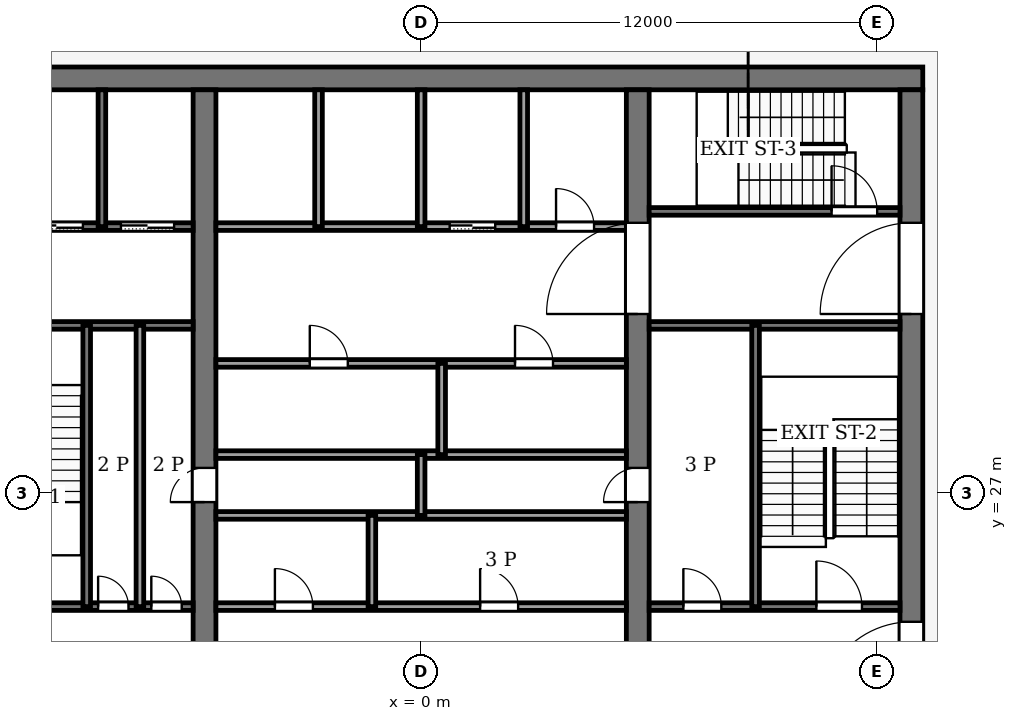
"""IFC4 building model, lengths in metres.
Left out: names, types, materials, properties, quantities, classifications, styles, units other than length and angle.
Written with IfcOpenShell. Run it as: python <this file> out.ifc"""

import sys

from ifc_helpers import new_model, si_unit, direction, frame, frame_2d, origin, place, context, subcontext, project, spatial, rectangle, extrude, element, fill, save


model = new_model("IFC4")
c1 = context("Model", 3, precision=1e-05, world=origin(), true_north=direction((0.0, 1.0)))
c2 = subcontext(c1, "Body", "Model", "MODEL_VIEW")
j1 = project(units=[si_unit("LENGTHUNIT", "METRE"), si_unit("PLANEANGLEUNIT", "RADIAN")], contexts=[c1])
p1 = place(None, origin())
s1 = spatial("IfcSite", under=j1, at=p1, CompositionType="ELEMENT")
p2 = place(p1, origin())
s2 = spatial("IfcBuilding", under=s1, at=p2, CompositionType="ELEMENT")
p3 = place(p2, frame((0.0, 0.0, 314.0)))
s3 = spatial("IfcBuildingStorey", under=s2, at=p3, CompositionType="ELEMENT", Elevation=314.0)
p4 = place(p3, frame((-13.2, 37.9, -0.13), z_axis=(0.0, 0.0, 1.0), x_axis=(1.0, 0.0, 0.0)))
e1 = element("IfcWall", 1, at=p4, inside=s3, PredefinedType="SHEAR", context=c2, shape_type="SweptSolid", body=[
    extrude(rectangle(XDim=26.4, YDim=0.6, at=frame_2d((13.2, 0.0))), origin(), (0.0, 0.0, 1.0), 4.0),
])
p5 = place(p3, frame((12.9, 18.4, -0.13), z_axis=(0.0, 0.0, 1.0), x_axis=(0.0, 1.0, 0.0)))
e2 = element("IfcWall", 2, at=p5, inside=s3, PredefinedType="SHEAR", context=c2, shape_type="SweptSolid", body=[
    extrude(rectangle(XDim=19.2, YDim=0.6, at=frame_2d((9.6, 0.0))), origin(), (0.0, 0.0, 1.0), 4.0),
])
p6 = place(p5, frame((2.8, 0.0, 0.13)))
e3 = element("IfcOpeningElement", 3, at=p6, cuts=e2, PredefinedType="OPENING", context=c2, shape_type="SweptSolid", body=[
    extrude(rectangle(XDim=2.4, YDim=2.4, at=frame_2d((1.2, 1.2))), frame((0.0, 0.31, 0.0), z_axis=(0.0, -1.0, 0.0), x_axis=(1.0, 0.0, 0.0)), (0.0, 0.0, 1.0), 0.62),
])
p7 = place(p5, frame((13.3, 0.0, 0.13)))
e4 = element("IfcOpeningElement", 4, at=p7, cuts=e2, PredefinedType="OPENING", context=c2, shape_type="SweptSolid", body=[
    extrude(rectangle(XDim=2.4, YDim=2.4, at=frame_2d((1.2, 1.2))), frame((0.0, 0.31, 0.0), z_axis=(0.0, -1.0, 0.0), x_axis=(1.0, 0.0, 0.0)), (0.0, 0.0, 1.0), 0.62),
])
p8 = place(p3, frame((-5.7, 18.4, -0.13), z_axis=(0.0, 0.0, 1.0), x_axis=(0.0, 1.0, 0.0)))
e5 = element("IfcWall", 5, at=p8, inside=s3, PredefinedType="SHEAR", context=c2, shape_type="SweptSolid", body=[
    extrude(rectangle(XDim=19.2, YDim=0.6, at=frame_2d((9.6, 0.0))), origin(), (0.0, 0.0, 1.0), 4.0),
])
p9 = place(p8, frame((8.35, 0.0, 0.13)))
e6 = element("IfcOpeningElement", 6, at=p9, cuts=e5, PredefinedType="OPENING", context=c2, shape_type="SweptSolid", body=[
    extrude(rectangle(XDim=0.9, YDim=2.1, at=frame_2d((0.45, 1.05))), frame((0.0, 0.31, 0.0), z_axis=(0.0, -1.0, 0.0), x_axis=(1.0, 0.0, 0.0)), (0.0, 0.0, 1.0), 0.62),
])
p10 = place(p3, frame((5.7, 18.4, -0.13), z_axis=(0.0, 0.0, 1.0), x_axis=(0.0, 1.0, 0.0)))
e7 = element("IfcWall", 7, at=p10, inside=s3, PredefinedType="SHEAR", context=c2, shape_type="SweptSolid", body=[
    extrude(rectangle(XDim=19.2, YDim=0.6, at=frame_2d((9.6, 0.0))), origin(), (0.0, 0.0, 1.0), 4.0),
])
p11 = place(p10, frame((8.35, 0.0, 0.13)))
e8 = element("IfcOpeningElement", 8, at=p11, cuts=e7, PredefinedType="OPENING", context=c2, shape_type="SweptSolid", body=[
    extrude(rectangle(XDim=0.9, YDim=2.1, at=frame_2d((0.45, 1.05))), frame((0.0, 0.31, 0.0), z_axis=(0.0, -1.0, 0.0), x_axis=(1.0, 0.0, 0.0)), (0.0, 0.0, 1.0), 0.62),
])
p12 = place(p10, frame((13.3, 0.0, 0.13)))
e9 = element("IfcOpeningElement", 9, at=p12, cuts=e7, PredefinedType="OPENING", context=c2, shape_type="SweptSolid", body=[
    extrude(rectangle(XDim=2.4, YDim=2.4, at=frame_2d((1.2, 1.2))), frame((0.0, 0.31, 0.0), z_axis=(0.0, -1.0, 0.0), x_axis=(1.0, 0.0, 0.0)), (0.0, 0.0, 1.0), 0.62),
])
p13 = place(p3, frame((-12.6, 24.0, 0.0), z_axis=(0.0, 0.0, 1.0), x_axis=(1.0, 0.0, 0.0)))
e10 = element("IfcWall", 10, at=p13, inside=s3, PredefinedType="PARTITIONING", context=c2, shape_type="SweptSolid", body=[
    extrude(rectangle(XDim=6.6, YDim=0.2, at=frame_2d((3.3, 0.0))), origin(), (0.0, 0.0, 1.0), 3.87),
])
p14 = place(p13, frame((4.1, 0.0, 0.0)))
e11 = element("IfcOpeningElement", 11, at=p14, cuts=e10, PredefinedType="OPENING", context=c2, shape_type="SweptSolid", body=[
    extrude(rectangle(XDim=0.8, YDim=2.1, at=frame_2d((0.4, 1.05))), frame((0.0, 0.11, 0.0), z_axis=(0.0, -1.0, 0.0), x_axis=(1.0, 0.0, 0.0)), (0.0, 0.0, 1.0), 0.22),
])
p15 = place(p13, frame((5.5, 0.0, 0.0)))
e12 = element("IfcOpeningElement", 12, at=p15, cuts=e10, PredefinedType="OPENING", context=c2, shape_type="SweptSolid", body=[
    extrude(rectangle(XDim=0.8, YDim=2.1, at=frame_2d((0.4, 1.05))), frame((0.0, 0.11, 0.0), z_axis=(0.0, -1.0, 0.0), x_axis=(1.0, 0.0, 0.0)), (0.0, 0.0, 1.0), 0.22),
])
p16 = place(p3, frame((-5.4, 24.0, 0.0), z_axis=(0.0, 0.0, 1.0), x_axis=(1.0, 0.0, 0.0)))
e13 = element("IfcWall", 13, at=p16, inside=s3, PredefinedType="PARTITIONING", context=c2, shape_type="SweptSolid", body=[
    extrude(rectangle(XDim=10.8, YDim=0.2, at=frame_2d((5.4, 0.0))), origin(), (0.0, 0.0, 1.0), 3.87),
])
p17 = place(p16, frame((1.552, 0.0, 0.0)))
e14 = element("IfcOpeningElement", 14, at=p17, cuts=e13, PredefinedType="OPENING", context=c2, shape_type="SweptSolid", body=[
    extrude(rectangle(XDim=1.0, YDim=2.1, at=frame_2d((0.5, 1.05))), frame((0.0, 0.11, 0.0), z_axis=(0.0, -1.0, 0.0), x_axis=(1.0, 0.0, 0.0)), (0.0, 0.0, 1.0), 0.22),
])
p18 = place(p16, frame((6.952, 0.0, 0.0)))
e15 = element("IfcOpeningElement", 15, at=p18, cuts=e13, PredefinedType="OPENING", context=c2, shape_type="SweptSolid", body=[
    extrude(rectangle(XDim=1.0, YDim=2.1, at=frame_2d((0.5, 1.05))), frame((0.0, 0.11, 0.0), z_axis=(0.0, -1.0, 0.0), x_axis=(1.0, 0.0, 0.0)), (0.0, 0.0, 1.0), 0.22),
])
p19 = place(p3, frame((6.0, 24.0, 0.0), z_axis=(0.0, 0.0, 1.0), x_axis=(1.0, 0.0, 0.0)))
e16 = element("IfcWall", 16, at=p19, inside=s3, PredefinedType="PARTITIONING", context=c2, shape_type="SweptSolid", body=[
    extrude(rectangle(XDim=6.6, YDim=0.2, at=frame_2d((3.3, 0.0))), origin(), (0.0, 0.0, 1.0), 3.87),
])
p20 = place(p19, frame((0.9, 0.0, 0.0)))
e17 = element("IfcOpeningElement", 17, at=p20, cuts=e16, PredefinedType="OPENING", context=c2, shape_type="SweptSolid", body=[
    extrude(rectangle(XDim=1.0, YDim=2.1, at=frame_2d((0.5, 1.05))), frame((0.0, 0.11, 0.0), z_axis=(0.0, -1.0, 0.0), x_axis=(1.0, 0.0, 0.0)), (0.0, 0.0, 1.0), 0.22),
])
p21 = place(p19, frame((4.4, 0.0, 0.0)))
e18 = element("IfcOpeningElement", 18, at=p21, cuts=e16, PredefinedType="OPENING", context=c2, shape_type="SweptSolid", body=[
    extrude(rectangle(XDim=1.2, YDim=2.2, at=frame_2d((0.6, 1.1))), frame((0.0, 0.11, 0.0), z_axis=(0.0, -1.0, 0.0), x_axis=(1.0, 0.0, 0.0)), (0.0, 0.0, 1.0), 0.22),
])
for number, where, z_axis, x_axis in (
    (19, (-5.4, 26.4, 0.0), (0.0, 0.0, 1.0), (1.0, 0.0, 0.0)),
    (20, (-5.4, 28.0, 0.0), (0.0, 0.0, 1.0), (1.0, 0.0, 0.0)),
):
    element("IfcWall", number, at=place(p3, frame(where, z_axis=z_axis, x_axis=x_axis)), inside=s3, PredefinedType="PARTITIONING", context=c2, shape_type="SweptSolid", body=[
        extrude(rectangle(XDim=10.8, YDim=0.2, at=frame_2d((5.4, 0.0))), origin(), (0.0, 0.0, 1.0), 3.87),
    ])
p22 = place(p3, frame((-5.4, 30.4, 0.0), z_axis=(0.0, 0.0, 1.0), x_axis=(1.0, 0.0, 0.0)))
e21 = element("IfcWall", 21, at=p22, inside=s3, PredefinedType="PARTITIONING", context=c2, shape_type="SweptSolid", body=[
    extrude(rectangle(XDim=10.8, YDim=0.2, at=frame_2d((5.4, 0.0))), origin(), (0.0, 0.0, 1.0), 3.87),
])
p23 = place(p22, frame((2.47, 0.0, 0.0)))
e22 = element("IfcOpeningElement", 22, at=p23, cuts=e21, PredefinedType="OPENING", context=c2, shape_type="SweptSolid", body=[
    extrude(rectangle(XDim=1.0, YDim=2.1, at=frame_2d((0.5, 1.05))), frame((0.0, 0.11, 0.0), z_axis=(0.0, -1.0, 0.0), x_axis=(1.0, 0.0, 0.0)), (0.0, 0.0, 1.0), 0.22),
])
p24 = place(p22, frame((7.87, 0.0, 0.0)))
e23 = element("IfcOpeningElement", 23, at=p24, cuts=e21, PredefinedType="OPENING", context=c2, shape_type="SweptSolid", body=[
    extrude(rectangle(XDim=1.0, YDim=2.1, at=frame_2d((0.5, 1.05))), frame((0.0, 0.11, 0.0), z_axis=(0.0, -1.0, 0.0), x_axis=(1.0, 0.0, 0.0)), (0.0, 0.0, 1.0), 0.22),
])
p25 = place(p3, frame((-12.6, 31.4, 0.0), z_axis=(0.0, 0.0, 1.0), x_axis=(1.0, 0.0, 0.0)))
e24 = element("IfcWall", 24, at=p25, inside=s3, PredefinedType="PARTITIONING", context=c2, shape_type="SweptSolid", body=[
    extrude(rectangle(XDim=6.6, YDim=0.2, at=frame_2d((3.3, 0.0))), origin(), (0.0, 0.0, 1.0), 3.87),
])
p26 = place(p25, frame((1.0, 0.0, 0.0)))
e25 = element("IfcOpeningElement", 25, at=p26, cuts=e24, PredefinedType="OPENING", context=c2, shape_type="SweptSolid", body=[
    extrude(rectangle(XDim=1.2, YDim=2.2, at=frame_2d((0.6, 1.1))), frame((0.0, 0.11, 0.0), z_axis=(0.0, -1.0, 0.0), x_axis=(1.0, 0.0, 0.0)), (0.0, 0.0, 1.0), 0.22),
])
p27 = place(p3, frame((6.0, 31.4, 0.0), z_axis=(0.0, 0.0, 1.0), x_axis=(1.0, 0.0, 0.0)))
e26 = element("IfcWall", 26, at=p27, inside=s3, PredefinedType="PARTITIONING", context=c2, shape_type="SweptSolid", body=[
    extrude(rectangle(XDim=6.6, YDim=0.2, at=frame_2d((3.3, 0.0))), origin(), (0.0, 0.0, 1.0), 3.87),
])
p28 = place(p3, frame((-12.6, 34.0, 0.0), z_axis=(0.0, 0.0, 1.0), x_axis=(1.0, 0.0, 0.0)))
e27 = element("IfcWall", 27, at=p28, inside=s3, PredefinedType="PARTITIONING", context=c2, shape_type="SweptSolid", body=[
    extrude(rectangle(XDim=6.6, YDim=0.2, at=frame_2d((3.3, 0.0))), origin(), (0.0, 0.0, 1.0), 3.87),
])
p29 = place(p28, frame((4.7, 0.0, 0.0)))
e28 = element("IfcOpeningElement", 28, at=p29, cuts=e27, PredefinedType="OPENING", context=c2, shape_type="SweptSolid", body=[
    extrude(rectangle(XDim=1.4, YDim=2.2, at=frame_2d((0.7, 1.1))), frame((0.0, 0.11, 0.0), z_axis=(0.0, -1.0, 0.0), x_axis=(1.0, 0.0, 0.0)), (0.0, 0.0, 1.0), 0.22),
])
p30 = place(p28, frame((2.3, 0.0, 0.0)))
e29 = element("IfcOpeningElement", 29, at=p30, cuts=e27, PredefinedType="OPENING", context=c2, shape_type="SweptSolid", body=[
    extrude(rectangle(XDim=1.4, YDim=2.2, at=frame_2d((0.7, 1.1))), frame((0.0, 0.11, 0.0), z_axis=(0.0, -1.0, 0.0), x_axis=(1.0, 0.0, 0.0)), (0.0, 0.0, 1.0), 0.22),
])
p31 = place(p28, frame((0.45, 0.0, 0.0)))
e30 = element("IfcOpeningElement", 30, at=p31, cuts=e27, PredefinedType="OPENING", context=c2, shape_type="SweptSolid", body=[
    extrude(rectangle(XDim=0.9, YDim=2.1, at=frame_2d((0.45, 1.05))), frame((0.0, 0.11, 0.0), z_axis=(0.0, -1.0, 0.0), x_axis=(1.0, 0.0, 0.0)), (0.0, 0.0, 1.0), 0.22),
])
p32 = place(p3, frame((-5.4, 34.0, 0.0), z_axis=(0.0, 0.0, 1.0), x_axis=(1.0, 0.0, 0.0)))
e31 = element("IfcWall", 31, at=p32, inside=s3, PredefinedType="PARTITIONING", context=c2, shape_type="SweptSolid", body=[
    extrude(rectangle(XDim=10.8, YDim=0.2, at=frame_2d((5.4, 0.0))), origin(), (0.0, 0.0, 1.0), 3.87),
])
p33 = place(p32, frame((6.15, 0.0, 0.0)))
e32 = element("IfcOpeningElement", 32, at=p33, cuts=e31, PredefinedType="OPENING", context=c2, shape_type="SweptSolid", body=[
    extrude(rectangle(XDim=1.2, YDim=2.2, at=frame_2d((0.6, 1.1))), frame((0.0, 0.11, 0.0), z_axis=(0.0, -1.0, 0.0), x_axis=(1.0, 0.0, 0.0)), (0.0, 0.0, 1.0), 0.22),
])
p34 = place(p32, frame((8.95, 0.0, 0.0)))
e33 = element("IfcOpeningElement", 33, at=p34, cuts=e31, PredefinedType="OPENING", context=c2, shape_type="SweptSolid", body=[
    extrude(rectangle(XDim=1.0, YDim=2.1, at=frame_2d((0.5, 1.05))), frame((0.0, 0.11, 0.0), z_axis=(0.0, -1.0, 0.0), x_axis=(1.0, 0.0, 0.0)), (0.0, 0.0, 1.0), 0.22),
])
p35 = place(p3, frame((6.0, 34.4, 0.0), z_axis=(0.0, 0.0, 1.0), x_axis=(1.0, 0.0, 0.0)))
e34 = element("IfcWall", 34, at=p35, inside=s3, PredefinedType="PARTITIONING", context=c2, shape_type="SweptSolid", body=[
    extrude(rectangle(XDim=6.6, YDim=0.2, at=frame_2d((3.3, 0.0))), origin(), (0.0, 0.0, 1.0), 3.87),
])
p36 = place(p35, frame((4.8, 0.0, 0.0)))
e35 = element("IfcOpeningElement", 35, at=p36, cuts=e34, PredefinedType="OPENING", context=c2, shape_type="SweptSolid", body=[
    extrude(rectangle(XDim=1.2, YDim=2.2, at=frame_2d((0.6, 1.1))), frame((0.0, 0.11, 0.0), z_axis=(0.0, -1.0, 0.0), x_axis=(1.0, 0.0, 0.0)), (0.0, 0.0, 1.0), 0.22),
])
p37 = place(p3, frame((-8.8, 24.0, 0.0), z_axis=(0.0, 0.0, 1.0), x_axis=(0.0, 1.0, 0.0)))
e36 = element("IfcWall", 36, at=p37, inside=s3, PredefinedType="PARTITIONING", context=c2, shape_type="SweptSolid", body=[
    extrude(rectangle(XDim=7.4, YDim=0.2, at=frame_2d((3.7, 0.0))), origin(), (0.0, 0.0, 1.0), 3.87),
])
p38 = place(p3, frame((-8.4, 34.0, 0.0), z_axis=(0.0, 0.0, 1.0), x_axis=(0.0, 1.0, 0.0)))
e37 = element("IfcWall", 37, at=p38, inside=s3, PredefinedType="PARTITIONING", context=c2, shape_type="SweptSolid", body=[
    extrude(rectangle(XDim=3.6, YDim=0.2, at=frame_2d((1.8, 0.0))), origin(), (0.0, 0.0, 1.0), 3.87),
])
p39 = place(p3, frame((-7.4, 24.0, 0.0), z_axis=(0.0, 0.0, 1.0), x_axis=(0.0, 1.0, 0.0)))
e38 = element("IfcWall", 38, at=p39, inside=s3, PredefinedType="PARTITIONING", context=c2, shape_type="SweptSolid", body=[
    extrude(rectangle(XDim=7.4, YDim=0.2, at=frame_2d((3.7, 0.0))), origin(), (0.0, 0.0, 1.0), 3.87),
])
p40 = place(p3, frame((-2.7, 34.0, 0.0), z_axis=(0.0, 0.0, 1.0), x_axis=(0.0, 1.0, 0.0)))
e39 = element("IfcWall", 39, at=p40, inside=s3, PredefinedType="PARTITIONING", context=c2, shape_type="SweptSolid", body=[
    extrude(rectangle(XDim=3.6, YDim=0.2, at=frame_2d((1.8, 0.0))), origin(), (0.0, 0.0, 1.0), 3.87),
])
p41 = place(p3, frame((-1.296, 24.0, 0.0), z_axis=(0.0, 0.0, 1.0), x_axis=(0.0, 1.0, 0.0)))
e40 = element("IfcWall", 40, at=p41, inside=s3, PredefinedType="PARTITIONING", context=c2, shape_type="SweptSolid", body=[
    extrude(rectangle(XDim=2.4, YDim=0.2, at=frame_2d((1.2, 0.0))), origin(), (0.0, 0.0, 1.0), 3.87),
])
p42 = place(p3, frame((0.0, 26.4, 0.0), z_axis=(0.0, 0.0, 1.0), x_axis=(0.0, 1.0, 0.0)))
e41 = element("IfcWall", 41, at=p42, inside=s3, PredefinedType="PARTITIONING", context=c2, shape_type="SweptSolid", body=[
    extrude(rectangle(XDim=1.6, YDim=0.2, at=frame_2d((0.8, 0.0))), origin(), (0.0, 0.0, 1.0), 3.87),
])
p43 = place(p3, frame((0.0, 34.0, 0.0), z_axis=(0.0, 0.0, 1.0), x_axis=(0.0, 1.0, 0.0)))
e42 = element("IfcWall", 42, at=p43, inside=s3, PredefinedType="PARTITIONING", context=c2, shape_type="SweptSolid", body=[
    extrude(rectangle(XDim=3.6, YDim=0.2, at=frame_2d((1.8, 0.0))), origin(), (0.0, 0.0, 1.0), 3.87),
])
p44 = place(p3, frame((0.54, 28.0, 0.0), z_axis=(0.0, 0.0, 1.0), x_axis=(0.0, 1.0, 0.0)))
e43 = element("IfcWall", 43, at=p44, inside=s3, PredefinedType="PARTITIONING", context=c2, shape_type="SweptSolid", body=[
    extrude(rectangle(XDim=2.4, YDim=0.2, at=frame_2d((1.2, 0.0))), origin(), (0.0, 0.0, 1.0), 3.87),
])
p45 = place(p3, frame((2.7, 34.0, 0.0), z_axis=(0.0, 0.0, 1.0), x_axis=(0.0, 1.0, 0.0)))
e44 = element("IfcWall", 44, at=p45, inside=s3, PredefinedType="PARTITIONING", context=c2, shape_type="SweptSolid", body=[
    extrude(rectangle(XDim=3.6, YDim=0.2, at=frame_2d((1.8, 0.0))), origin(), (0.0, 0.0, 1.0), 3.87),
])
p46 = place(p3, frame((8.8, 24.0, 0.0), z_axis=(0.0, 0.0, 1.0), x_axis=(0.0, 1.0, 0.0)))
e45 = element("IfcWall", 45, at=p46, inside=s3, PredefinedType="PARTITIONING", context=c2, shape_type="SweptSolid", body=[
    extrude(rectangle(XDim=7.4, YDim=0.2, at=frame_2d((3.7, 0.0))), origin(), (0.0, 0.0, 1.0), 3.87),
])
p47 = place(p33, origin())
e46 = element("IfcDoor", 46, at=p47, inside=s3, OperationType="SLIDING_TO_LEFT", PredefinedType="DOOR", context=c2, shape_type="SweptSolid", body=[
    extrude(rectangle(XDim=1.2, YDim=2.2, at=frame_2d((0.6, 1.1))), frame((0.0, 0.025, 0.0), z_axis=(0.0, -1.0, 0.0), x_axis=(1.0, 0.0, 0.0)), (0.0, 0.0, 1.0), 0.05),
])
fill(e32, e46)
p48 = place(p29, origin())
e47 = element("IfcDoor", 47, at=p48, inside=s3, OperationType="SLIDING_TO_LEFT", PredefinedType="DOOR", context=c2, shape_type="SweptSolid", body=[
    extrude(rectangle(XDim=1.4, YDim=2.2, at=frame_2d((0.7, 1.1))), frame((0.0, 0.025, 0.0), z_axis=(0.0, -1.0, 0.0), x_axis=(1.0, 0.0, 0.0)), (0.0, 0.0, 1.0), 0.05),
])
fill(e28, e47)
p49 = place(p30, origin())
e48 = element("IfcDoor", 48, at=p49, inside=s3, OperationType="SLIDING_TO_LEFT", PredefinedType="DOOR", context=c2, shape_type="SweptSolid", body=[
    extrude(rectangle(XDim=1.4, YDim=2.2, at=frame_2d((0.7, 1.1))), frame((0.0, 0.025, 0.0), z_axis=(0.0, -1.0, 0.0), x_axis=(1.0, 0.0, 0.0)), (0.0, 0.0, 1.0), 0.05),
])
fill(e29, e48)
p50 = place(p17, origin())
e49 = element("IfcDoor", 49, at=p50, inside=s3, OperationType="SINGLE_SWING_LEFT", PredefinedType="DOOR", context=c2, shape_type="SweptSolid", body=[
    extrude(rectangle(XDim=1.0, YDim=2.1, at=frame_2d((0.5, 1.05))), frame((0.0, 0.025, 0.0), z_axis=(0.0, -1.0, 0.0), x_axis=(1.0, 0.0, 0.0)), (0.0, 0.0, 1.0), 0.05),
])
fill(e14, e49)
p51 = place(p18, origin())
e50 = element("IfcDoor", 50, at=p51, inside=s3, OperationType="SINGLE_SWING_RIGHT", PredefinedType="DOOR", context=c2, shape_type="SweptSolid", body=[
    extrude(rectangle(XDim=1.0, YDim=2.1, at=frame_2d((0.5, 1.05))), frame((0.0, 0.025, 0.0), z_axis=(0.0, -1.0, 0.0), x_axis=(1.0, 0.0, 0.0)), (0.0, 0.0, 1.0), 0.05),
])
fill(e15, e50)
p52 = place(p23, origin())
e51 = element("IfcDoor", 51, at=p52, inside=s3, OperationType="SINGLE_SWING_RIGHT", PredefinedType="DOOR", context=c2, shape_type="SweptSolid", body=[
    extrude(rectangle(XDim=1.0, YDim=2.1, at=frame_2d((0.5, 1.05))), frame((0.0, 0.025, 0.0), z_axis=(0.0, -1.0, 0.0), x_axis=(1.0, 0.0, 0.0)), (0.0, 0.0, 1.0), 0.05),
])
fill(e22, e51)
p53 = place(p24, origin())
e52 = element("IfcDoor", 52, at=p53, inside=s3, OperationType="SINGLE_SWING_LEFT", PredefinedType="DOOR", context=c2, shape_type="SweptSolid", body=[
    extrude(rectangle(XDim=1.0, YDim=2.1, at=frame_2d((0.5, 1.05))), frame((0.0, 0.025, 0.0), z_axis=(0.0, -1.0, 0.0), x_axis=(1.0, 0.0, 0.0)), (0.0, 0.0, 1.0), 0.05),
])
fill(e23, e52)
p54 = place(p14, origin())
e53 = element("IfcDoor", 53, at=p54, inside=s3, OperationType="SINGLE_SWING_LEFT", PredefinedType="DOOR", context=c2, shape_type="SweptSolid", body=[
    extrude(rectangle(XDim=0.8, YDim=2.1, at=frame_2d((0.4, 1.05))), frame((0.0, 0.025, 0.0), z_axis=(0.0, -1.0, 0.0), x_axis=(1.0, 0.0, 0.0)), (0.0, 0.0, 1.0), 0.05),
])
fill(e11, e53)
p55 = place(p15, origin())
e54 = element("IfcDoor", 54, at=p55, inside=s3, OperationType="SINGLE_SWING_RIGHT", PredefinedType="DOOR", context=c2, shape_type="SweptSolid", body=[
    extrude(rectangle(XDim=0.8, YDim=2.1, at=frame_2d((0.4, 1.05))), frame((0.0, 0.025, 0.0), z_axis=(0.0, -1.0, 0.0), x_axis=(1.0, 0.0, 0.0)), (0.0, 0.0, 1.0), 0.05),
])
fill(e12, e54)
p56 = place(p20, origin())
e55 = element("IfcDoor", 55, at=p56, inside=s3, OperationType="SINGLE_SWING_RIGHT", PredefinedType="DOOR", context=c2, shape_type="SweptSolid", body=[
    extrude(rectangle(XDim=1.0, YDim=2.1, at=frame_2d((0.5, 1.05))), frame((0.0, 0.025, 0.0), z_axis=(0.0, -1.0, 0.0), x_axis=(1.0, 0.0, 0.0)), (0.0, 0.0, 1.0), 0.05),
])
fill(e17, e55)
p57 = place(p34, origin())
e56 = element("IfcDoor", 56, at=p57, inside=s3, OperationType="SINGLE_SWING_LEFT", PredefinedType="DOOR", context=c2, shape_type="SweptSolid", body=[
    extrude(rectangle(XDim=1.0, YDim=2.1, at=frame_2d((0.5, 1.05))), frame((0.0, 0.025, 0.0), z_axis=(0.0, -1.0, 0.0), x_axis=(1.0, 0.0, 0.0)), (0.0, 0.0, 1.0), 0.05),
])
fill(e33, e56)
p58 = place(p9, origin())
e57 = element("IfcDoor", 57, at=p58, inside=s3, OperationType="SINGLE_SWING_LEFT", PredefinedType="DOOR", context=c2, shape_type="SweptSolid", body=[
    extrude(rectangle(XDim=0.9, YDim=2.1, at=frame_2d((0.45, 1.05))), frame((0.0, 0.025, 0.0), z_axis=(0.0, -1.0, 0.0), x_axis=(1.0, 0.0, 0.0)), (0.0, 0.0, 1.0), 0.05),
])
fill(e6, e57)
p59 = place(p11, origin())
e58 = element("IfcDoor", 58, at=p59, inside=s3, OperationType="SINGLE_SWING_RIGHT", PredefinedType="DOOR", context=c2, shape_type="SweptSolid", body=[
    extrude(rectangle(XDim=0.9, YDim=2.1, at=frame_2d((0.45, 1.05))), frame((0.0, 0.025, 0.0), z_axis=(0.0, -1.0, 0.0), x_axis=(1.0, 0.0, 0.0)), (0.0, 0.0, 1.0), 0.05),
])
fill(e8, e58)
p60 = place(p21, origin())
e59 = element("IfcDoor", 59, at=p60, inside=s3, OperationType="SINGLE_SWING_LEFT", PredefinedType="DOOR", context=c2, shape_type="SweptSolid", body=[
    extrude(rectangle(XDim=1.2, YDim=2.2, at=frame_2d((0.6, 1.1))), frame((0.0, 0.025, 0.0), z_axis=(0.0, -1.0, 0.0), x_axis=(1.0, 0.0, 0.0)), (0.0, 0.0, 1.0), 0.05),
])
fill(e18, e59)
p61 = place(p36, origin())
e60 = element("IfcDoor", 60, at=p61, inside=s3, OperationType="SINGLE_SWING_RIGHT", PredefinedType="DOOR", context=c2, shape_type="SweptSolid", body=[
    extrude(rectangle(XDim=1.2, YDim=2.2, at=frame_2d((0.6, 1.1))), frame((0.0, 0.025, 0.0), z_axis=(0.0, -1.0, 0.0), x_axis=(1.0, 0.0, 0.0)), (0.0, 0.0, 1.0), 0.05),
])
fill(e35, e60)
p62 = place(p12, origin())
e61 = element("IfcDoor", 61, at=p62, inside=s3, OperationType="DOUBLE_DOOR_SINGLE_SWING", PredefinedType="DOOR", context=c2, shape_type="SweptSolid", body=[
    extrude(rectangle(XDim=2.4, YDim=2.4, at=frame_2d((1.2, 1.2))), frame((0.0, 0.025, 0.0), z_axis=(0.0, -1.0, 0.0), x_axis=(1.0, 0.0, 0.0)), (0.0, 0.0, 1.0), 0.05),
])
fill(e9, e61)
p63 = place(p6, origin())
e62 = element("IfcDoor", 62, at=p63, inside=s3, OperationType="DOUBLE_DOOR_SINGLE_SWING", PredefinedType="DOOR", context=c2, shape_type="SweptSolid", body=[
    extrude(rectangle(XDim=2.4, YDim=2.4, at=frame_2d((1.2, 1.2))), frame((0.0, 0.025, 0.0), z_axis=(0.0, -1.0, 0.0), x_axis=(1.0, 0.0, 0.0)), (0.0, 0.0, 1.0), 0.05),
])
fill(e3, e62)
p64 = place(p7, origin())
e63 = element("IfcDoor", 63, at=p64, inside=s3, OperationType="DOUBLE_DOOR_SINGLE_SWING", PredefinedType="DOOR", context=c2, shape_type="SweptSolid", body=[
    extrude(rectangle(XDim=2.4, YDim=2.4, at=frame_2d((1.2, 1.2))), frame((0.0, 0.025, 0.0), z_axis=(0.0, -1.0, 0.0), x_axis=(1.0, 0.0, 0.0)), (0.0, 0.0, 1.0), 0.05),
])
fill(e4, e63)
save(model, sys.argv[1])
